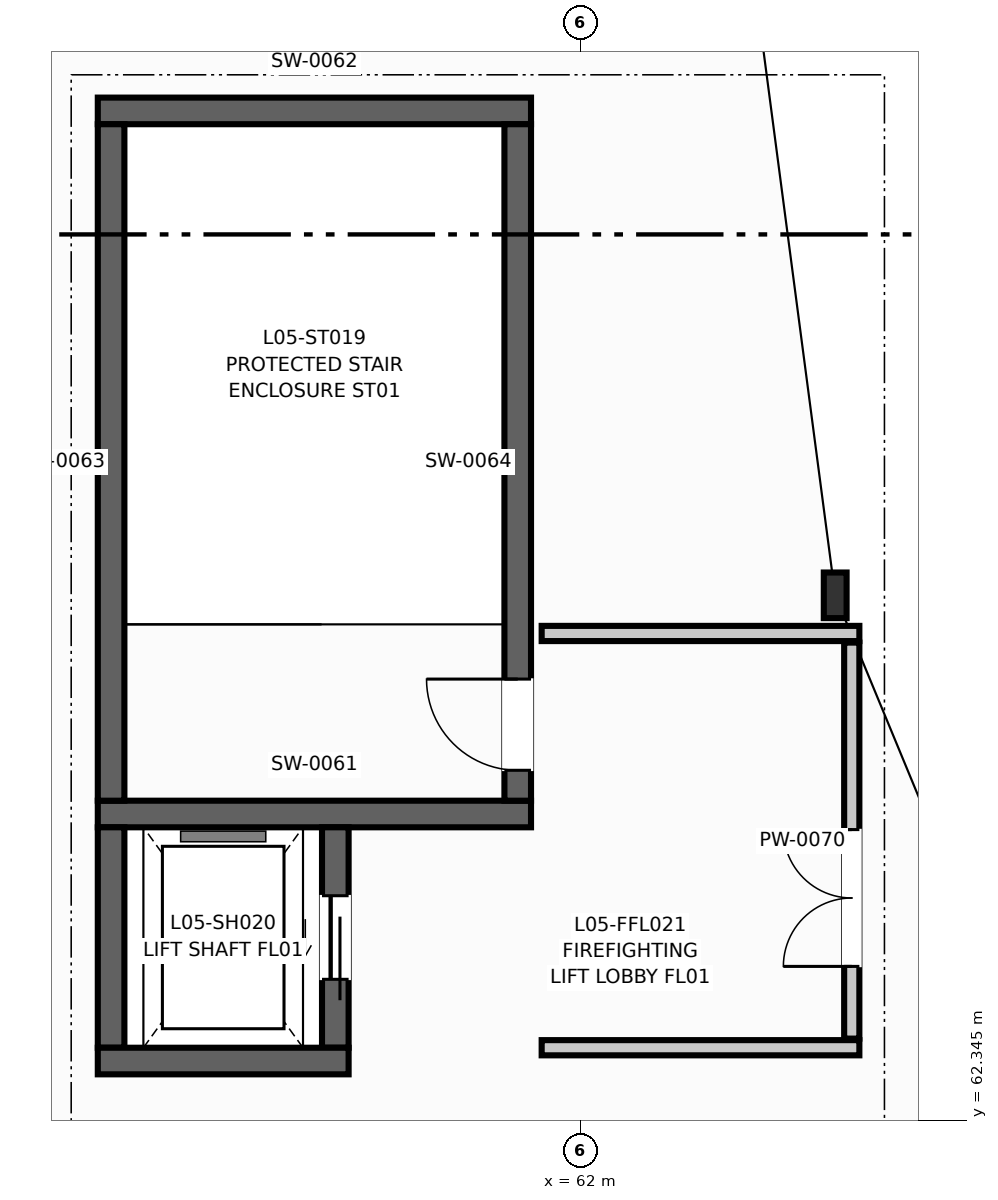
"""IFC4 building model, lengths in metres.
Left out: names, types, materials, properties, quantities, classifications, styles, units other than length and angle.
Written with IfcOpenShell. Run it as: python <this file> out.ifc"""

import sys

from ifc_helpers import new_model, si_unit, direction, frame, frame_2d, origin, origin_2d, place, context, subcontext, project, spatial, rectangle, i_section, extrude, element, fill, save


model = new_model("IFC4")
c1 = context("Model", 3, precision=1e-05, world=origin(), true_north=direction((0.0, 1.0)))
c2 = subcontext(c1, "Body", "Model", "MODEL_VIEW")
j1 = project(units=[si_unit("LENGTHUNIT", "METRE"), si_unit("PLANEANGLEUNIT", "RADIAN")], contexts=[c1])
p1 = place(None, origin())
s1 = spatial("IfcSite", under=j1, at=p1, CompositionType="ELEMENT")
p2 = place(p1, origin())
s2 = spatial("IfcBuilding", under=s1, at=p2, CompositionType="ELEMENT")
p3 = place(p2, frame((0.0, 0.0, 22.5)))
s3 = spatial("IfcBuildingStorey", under=s2, at=p3, CompositionType="ELEMENT", Elevation=22.5)
p4 = place(p3, frame((65.352, 69.252, 0.0), z_axis=(0.0, 0.0, 1.0), x_axis=(1.0, 0.0, 0.0)))
e1 = element("IfcColumn", 1, at=p4, inside=s3, PredefinedType="COLUMN", context=c2, shape_type="SweptSolid", body=[
    extrude(i_section(OverallWidth=0.3, OverallDepth=0.6, WebThickness=0.015, FlangeThickness=0.03, at=origin_2d()), origin(), (0.0, 0.0, 1.0), 4.5),
])
for number, where, z_axis, x_axis in (
    (2, (55.65, 66.375, 0.0), (0.0, 0.0, 1.0), (1.0, 0.0, 0.0)),
    (3, (55.65, 75.625, 0.0), (0.0, 0.0, 1.0), (1.0, 0.0, 0.0)),
):
    element("IfcWall", number, at=place(p3, frame(where, z_axis=z_axis, x_axis=x_axis)), inside=s3, PredefinedType="SHEAR", context=c2, shape_type="SweptSolid", body=[
        extrude(rectangle(XDim=5.7, YDim=0.35, at=frame_2d((2.85, 0.0))), origin(), (0.0, 0.0, 1.0), 4.28),
    ])
p5 = place(p3, frame((55.825, 66.55, 0.0), z_axis=(0.0, 0.0, 1.0), x_axis=(0.0, 1.0, 0.0)))
e4 = element("IfcWall", 4, at=p5, inside=s3, PredefinedType="SHEAR", context=c2, shape_type="SweptSolid", body=[
    extrude(rectangle(XDim=8.9, YDim=0.35, at=frame_2d((4.45, 0.0))), origin(), (0.0, 0.0, 1.0), 4.28),
])
p6 = place(p3, frame((61.175, 66.55, 0.0), z_axis=(0.0, 0.0, 1.0), x_axis=(0.0, 1.0, 0.0)))
e5 = element("IfcWall", 5, at=p6, inside=s3, PredefinedType="SHEAR", context=c2, shape_type="SweptSolid", body=[
    extrude(rectangle(XDim=8.9, YDim=0.35, at=frame_2d((4.45, 0.0))), origin(), (0.0, 0.0, 1.0), 4.28),
])
p7 = place(p6, frame((0.4, 0.0, 0.0)))
e6 = element("IfcOpeningElement", 6, at=p7, cuts=e5, PredefinedType="OPENING", context=c2, shape_type="SweptSolid", body=[
    extrude(rectangle(XDim=1.2, YDim=2.2, at=frame_2d((0.6, 1.1))), frame((0.0, 0.185, 0.0), z_axis=(0.0, -1.0, 0.0), x_axis=(1.0, 0.0, 0.0)), (0.0, 0.0, 1.0), 0.37),
])
p8 = place(p3, frame((55.825, 63.3, 0.0), z_axis=(0.0, 0.0, 1.0), x_axis=(0.0, 1.0, 0.0)))
e7 = element("IfcWall", 7, at=p8, inside=s3, PredefinedType="SHEAR", context=c2, shape_type="SweptSolid", body=[
    extrude(rectangle(XDim=2.9, YDim=0.35, at=frame_2d((1.45, 0.0))), origin(), (0.0, 0.0, 1.0), 4.28),
])
p9 = place(p3, frame((58.775, 63.3, 0.0), z_axis=(0.0, 0.0, 1.0), x_axis=(0.0, 1.0, 0.0)))
e8 = element("IfcWall", 8, at=p9, inside=s3, PredefinedType="SHEAR", context=c2, shape_type="SweptSolid", body=[
    extrude(rectangle(XDim=2.9, YDim=0.35, at=frame_2d((1.45, 0.0))), origin(), (0.0, 0.0, 1.0), 4.28),
])
p10 = place(p9, frame((0.9, 0.0, 0.0)))
e9 = element("IfcOpeningElement", 9, at=p10, cuts=e8, PredefinedType="OPENING", context=c2, shape_type="SweptSolid", body=[
    extrude(rectangle(XDim=1.1, YDim=2.2, at=frame_2d((0.55, 1.1))), frame((0.0, 0.185, 0.0), z_axis=(0.0, -1.0, 0.0), x_axis=(1.0, 0.0, 0.0)), (0.0, 0.0, 1.0), 0.37),
])
p11 = place(p3, frame((55.65, 63.125, 0.0), z_axis=(0.0, 0.0, 1.0), x_axis=(1.0, 0.0, 0.0)))
e10 = element("IfcWall", 10, at=p11, inside=s3, PredefinedType="SHEAR", context=c2, shape_type="SweptSolid", body=[
    extrude(rectangle(XDim=3.3, YDim=0.35, at=frame_2d((1.65, 0.0))), origin(), (0.0, 0.0, 1.0), 4.28),
])
for number, where, z_axis, x_axis in (
    (11, (61.49, 63.3, 0.0), (0.0, 0.0, 1.0), (1.0, 0.0, 0.0)),
    (12, (61.49, 68.75, 0.0), (0.0, 0.0, 1.0), (1.0, 0.0, 0.0)),
):
    element("IfcWall", number, at=place(p3, frame(where, z_axis=z_axis, x_axis=x_axis)), inside=s3, PredefinedType="PARTITIONING", context=c2, shape_type="SweptSolid", body=[
        extrude(rectangle(XDim=4.18, YDim=0.2, at=frame_2d((2.09, 0.0))), origin(), (0.0, 0.0, 1.0), 3.22),
    ])
p12 = place(p3, frame((65.57, 63.42, 0.0), z_axis=(0.0, 0.0, 1.0), x_axis=(0.0, 1.0, 0.0)))
e13 = element("IfcWall", 13, at=p12, inside=s3, PredefinedType="PARTITIONING", context=c2, shape_type="SweptSolid", body=[
    extrude(rectangle(XDim=5.21, YDim=0.2, at=frame_2d((2.605, 0.0))), origin(), (0.0, 0.0, 1.0), 3.22),
])
p13 = place(p12, frame((0.95, 0.0, 0.0)))
e14 = element("IfcOpeningElement", 14, at=p13, cuts=e13, PredefinedType="OPENING", context=c2, shape_type="SweptSolid", body=[
    extrude(rectangle(XDim=1.8, YDim=2.2, at=frame_2d((0.9, 1.1))), frame((0.0, 0.11, 0.0), z_axis=(0.0, -1.0, 0.0), x_axis=(1.0, 0.0, 0.0)), (0.0, 0.0, 1.0), 0.22),
])
p14 = place(p7, origin())
e15 = element("IfcDoor", 15, at=p14, inside=s3, OperationType="SINGLE_SWING_RIGHT", PredefinedType="DOOR", context=c2, shape_type="SweptSolid", body=[
    extrude(rectangle(XDim=1.2, YDim=2.2, at=frame_2d((0.6, 1.1))), frame((0.0, 0.025, 0.0), z_axis=(0.0, -1.0, 0.0), x_axis=(1.0, 0.0, 0.0)), (0.0, 0.0, 1.0), 0.05),
])
fill(e6, e15)
p15 = place(p10, origin())
e16 = element("IfcDoor", 16, at=p15, inside=s3, OperationType="SLIDING_TO_LEFT", PredefinedType="DOOR", context=c2, shape_type="SweptSolid", body=[
    extrude(rectangle(XDim=1.1, YDim=2.2, at=frame_2d((0.55, 1.1))), frame((0.0, 0.025, 0.0), z_axis=(0.0, -1.0, 0.0), x_axis=(1.0, 0.0, 0.0)), (0.0, 0.0, 1.0), 0.05),
])
fill(e9, e16)
p16 = place(p13, origin())
e17 = element("IfcDoor", 17, at=p16, inside=s3, OperationType="DOUBLE_DOOR_SINGLE_SWING", PredefinedType="DOOR", context=c2, shape_type="SweptSolid", body=[
    extrude(rectangle(XDim=1.8, YDim=2.2, at=frame_2d((0.9, 1.1))), frame((0.0, 0.025, 0.0), z_axis=(0.0, -1.0, 0.0), x_axis=(1.0, 0.0, 0.0)), (0.0, 0.0, 1.0), 0.05),
])
fill(e14, e17)
save(model, sys.argv[1])
